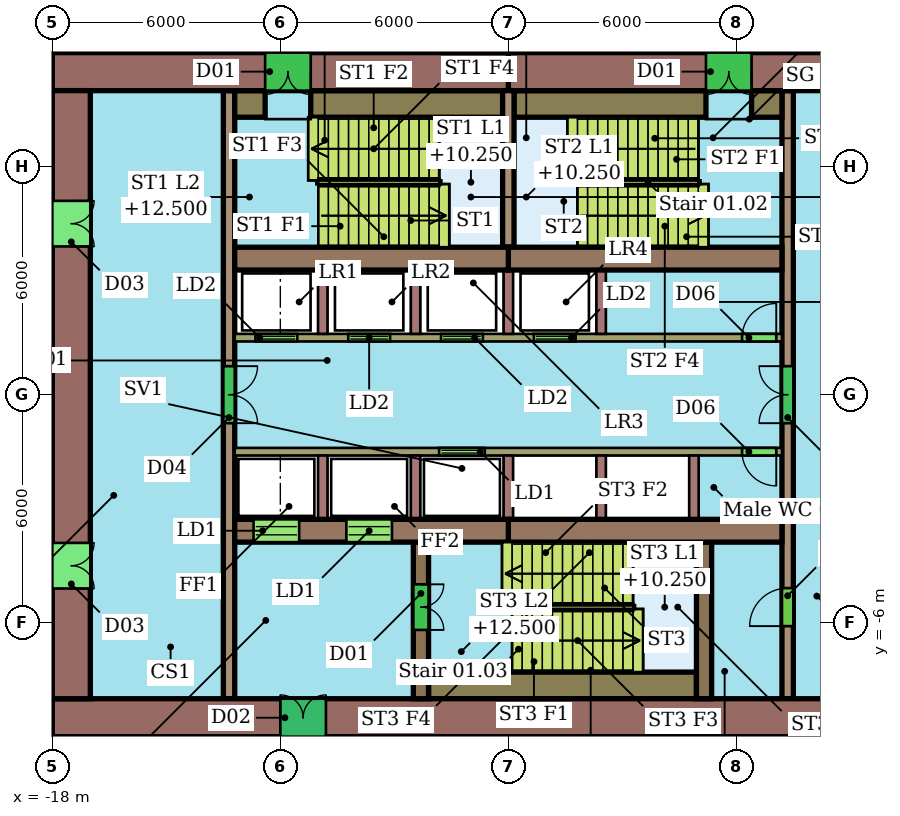
"""IFC4 building model, lengths in metres.
Left out: names, types, materials, properties, quantities, classifications, styles, units other than length and angle.
Written with IfcOpenShell. Run it as: python <this file> out.ifc"""

import sys

from ifc_helpers import new_model, si_unit, direction, frame, frame_2d, origin, place, context, subcontext, project, spatial, rectangle, extrude, element, fill, save


model = new_model("IFC4")
c1 = context("Model", 3, precision=1e-05, world=origin(), true_north=direction((0.0, 1.0)))
c2 = subcontext(c1, "Body", "Model", "MODEL_VIEW")
j1 = project(units=[si_unit("LENGTHUNIT", "METRE"), si_unit("PLANEANGLEUNIT", "RADIAN")], contexts=[c1])
p1 = place(None, origin())
s1 = spatial("IfcSite", under=j1, at=p1, CompositionType="ELEMENT")
p2 = place(p1, origin())
s2 = spatial("IfcBuilding", under=s1, at=p2, CompositionType="ELEMENT")
p3 = place(p2, frame((0.0, 0.0, 8.0)))
s3 = spatial("IfcBuildingStorey", under=s2, at=p3, CompositionType="ELEMENT", Elevation=8.0)
p4 = place(p3, frame((6.0, 8.5, 0.0), z_axis=(0.0, 0.0, 1.0), x_axis=(-1.0, 0.0, 0.0)))
e1 = element("IfcWall", 1, at=p4, inside=s3, PredefinedType="SHEAR", context=c2, shape_type="SweptSolid", body=[
    extrude(rectangle(XDim=12.0, YDim=1.0, at=frame_2d((6.0, 0.0))), origin(), (0.0, 0.0, 1.0), 8.7),
])
p5 = place(p4, frame((5.6, 0.0, 0.0)))
e2 = element("IfcOpeningElement", 2, at=p5, cuts=e1, PredefinedType="OPENING", context=c2, shape_type="SweptSolid", body=[
    extrude(rectangle(XDim=1.2, YDim=2.1, at=frame_2d((0.6, 1.05))), frame((0.0, 0.51, 0.0), z_axis=(0.0, -1.0, 0.0), x_axis=(1.0, 0.0, 0.0)), (0.0, 0.0, 1.0), 1.02),
])
p6 = place(p3, frame((-6.0, 8.5, 0.0), z_axis=(0.0, 0.0, 1.0), x_axis=(-1.0, 0.0, 0.0)))
e3 = element("IfcWall", 3, at=p6, inside=s3, PredefinedType="SHEAR", context=c2, shape_type="SweptSolid", body=[
    extrude(rectangle(XDim=12.0, YDim=1.0, at=frame_2d((6.0, 0.0))), origin(), (0.0, 0.0, 1.0), 8.7),
])
p7 = place(p6, frame((5.2, 0.0, 0.0)))
e4 = element("IfcOpeningElement", 4, at=p7, cuts=e3, PredefinedType="OPENING", context=c2, shape_type="SweptSolid", body=[
    extrude(rectangle(XDim=1.2, YDim=2.1, at=frame_2d((0.6, 1.05))), frame((0.0, 0.51, 0.0), z_axis=(0.0, -1.0, 0.0), x_axis=(1.0, 0.0, 0.0)), (0.0, 0.0, 1.0), 1.02),
])
p8 = place(p3, frame((-18.0, -8.5, 0.0), z_axis=(0.0, 0.0, 1.0), x_axis=(1.0, 0.0, 0.0)))
e5 = element("IfcWall", 5, at=p8, inside=s3, PredefinedType="SHEAR", context=c2, shape_type="SweptSolid", body=[
    extrude(rectangle(XDim=24.0, YDim=1.0, at=frame_2d((12.0, 0.0))), origin(), (0.0, 0.0, 1.0), 8.7),
])
p9 = place(p8, frame((6.0, 0.0, 0.0)))
e6 = element("IfcOpeningElement", 6, at=p9, cuts=e5, PredefinedType="OPENING", context=c2, shape_type="SweptSolid", body=[
    extrude(rectangle(XDim=1.2, YDim=2.1, at=frame_2d((0.6, 1.05))), frame((0.0, 0.51, 0.0), z_axis=(0.0, -1.0, 0.0), x_axis=(1.0, 0.0, 0.0)), (0.0, 0.0, 1.0), 1.02),
])
p10 = place(p3, frame((-17.5, 8.0, 0.0), z_axis=(0.0, 0.0, 1.0), x_axis=(0.0, -1.0, 0.0)))
e7 = element("IfcWall", 7, at=p10, inside=s3, PredefinedType="SHEAR", context=c2, shape_type="SweptSolid", body=[
    extrude(rectangle(XDim=16.0, YDim=1.0, at=frame_2d((8.0, 0.0))), origin(), (0.0, 0.0, 1.0), 8.7),
])
p11 = place(p10, frame((11.9, 0.0, 0.0)))
e8 = element("IfcOpeningElement", 8, at=p11, cuts=e7, PredefinedType="OPENING", context=c2, shape_type="SweptSolid", body=[
    extrude(rectangle(XDim=1.2, YDim=2.1, at=frame_2d((0.6, 1.05))), frame((0.0, 0.51, 0.0), z_axis=(0.0, -1.0, 0.0), x_axis=(1.0, 0.0, 0.0)), (0.0, 0.0, 1.0), 1.02),
])
p12 = place(p10, frame((2.9, 0.0, 0.0)))
e9 = element("IfcOpeningElement", 9, at=p12, cuts=e7, PredefinedType="OPENING", context=c2, shape_type="SweptSolid", body=[
    extrude(rectangle(XDim=1.2, YDim=2.1, at=frame_2d((0.6, 1.05))), frame((0.0, 0.51, 0.0), z_axis=(0.0, -1.0, 0.0), x_axis=(1.0, 0.0, 0.0)), (0.0, 0.0, 1.0), 1.02),
])
for number, where, z_axis, x_axis in (
    (10, (-13.2, 3.58, 0.0), (0.0, 0.0, 1.0), (1.0, 0.0, 0.0)),
    (11, (-6.0, 3.58, 0.0), (0.0, 0.0, 1.0), (1.0, 0.0, 0.0)),
):
    element("IfcWall", number, at=place(p3, frame(where, z_axis=z_axis, x_axis=x_axis)), inside=s3, PredefinedType="SHEAR", context=c2, shape_type="SweptSolid", body=[
        extrude(rectangle(XDim=7.2, YDim=0.6, at=frame_2d((3.6, 0.0))), origin(), (0.0, 0.0, 1.0), 8.7),
    ])
p13 = place(p3, frame((-13.2, -3.58, 0.0), z_axis=(0.0, 0.0, 1.0), x_axis=(1.0, 0.0, 0.0)))
e12 = element("IfcWall", 12, at=p13, inside=s3, PredefinedType="SHEAR", context=c2, shape_type="SweptSolid", body=[
    extrude(rectangle(XDim=7.2, YDim=0.6, at=frame_2d((3.6, 0.0))), origin(), (0.0, 0.0, 1.0), 8.7),
])
p14 = place(p13, frame((0.496, 0.0, 0.0)))
e13 = element("IfcOpeningElement", 13, at=p14, cuts=e12, PredefinedType="OPENING", context=c2, shape_type="SweptSolid", body=[
    extrude(rectangle(XDim=1.2, YDim=2.1, at=frame_2d((0.6, 1.05))), frame((0.0, 0.31, 0.0), z_axis=(0.0, -1.0, 0.0), x_axis=(1.0, 0.0, 0.0)), (0.0, 0.0, 1.0), 0.62),
])
p15 = place(p13, frame((2.938, 0.0, 0.0)))
e14 = element("IfcOpeningElement", 14, at=p15, cuts=e12, PredefinedType="OPENING", context=c2, shape_type="SweptSolid", body=[
    extrude(rectangle(XDim=1.2, YDim=2.1, at=frame_2d((0.6, 1.05))), frame((0.0, 0.31, 0.0), z_axis=(0.0, -1.0, 0.0), x_axis=(1.0, 0.0, 0.0)), (0.0, 0.0, 1.0), 0.62),
])
p16 = place(p3, frame((-6.0, -3.58, 0.0), z_axis=(0.0, 0.0, 1.0), x_axis=(1.0, 0.0, 0.0)))
e15 = element("IfcWall", 15, at=p16, inside=s3, PredefinedType="SHEAR", context=c2, shape_type="SweptSolid", body=[
    extrude(rectangle(XDim=7.2, YDim=0.6, at=frame_2d((3.6, 0.0))), origin(), (0.0, 0.0, 1.0), 8.7),
])
p17 = place(p3, frame((-13.35, 8.0, 0.0), z_axis=(0.0, 0.0, 1.0), x_axis=(0.0, -1.0, 0.0)))
e16 = element("IfcWall", 16, at=p17, inside=s3, PredefinedType="SHEAR", context=c2, shape_type="SweptSolid", body=[
    extrude(rectangle(XDim=16.0, YDim=0.3, at=frame_2d((8.0, 0.0))), origin(), (0.0, 0.0, 1.0), 8.7),
])
p18 = place(p17, frame((7.25, 0.0, 0.0)))
e17 = element("IfcOpeningElement", 17, at=p18, cuts=e16, PredefinedType="OPENING", context=c2, shape_type="SweptSolid", body=[
    extrude(rectangle(XDim=1.5, YDim=2.1, at=frame_2d((0.75, 1.05))), frame((0.0, 0.16, 0.0), z_axis=(0.0, -1.0, 0.0), x_axis=(1.0, 0.0, 0.0)), (0.0, 0.0, 1.0), 0.32),
])
p19 = place(p3, frame((1.35, -8.0, 0.0), z_axis=(0.0, 0.0, 1.0), x_axis=(0.0, 1.0, 0.0)))
e18 = element("IfcWall", 18, at=p19, inside=s3, PredefinedType="SHEAR", context=c2, shape_type="SweptSolid", body=[
    extrude(rectangle(XDim=16.0, YDim=0.3, at=frame_2d((8.0, 0.0))), origin(), (0.0, 0.0, 1.0), 8.7),
])
p20 = place(p19, frame((1.91, 0.0, 0.0)))
e19 = element("IfcOpeningElement", 19, at=p20, cuts=e18, PredefinedType="OPENING", context=c2, shape_type="SweptSolid", body=[
    extrude(rectangle(XDim=1.0, YDim=2.1, at=frame_2d((0.5, 1.05))), frame((0.0, 0.16, 0.0), z_axis=(0.0, -1.0, 0.0), x_axis=(1.0, 0.0, 0.0)), (0.0, 0.0, 1.0), 0.32),
])
p21 = place(p19, frame((7.25, 0.0, 0.0)))
e20 = element("IfcOpeningElement", 20, at=p21, cuts=e18, PredefinedType="OPENING", context=c2, shape_type="SweptSolid", body=[
    extrude(rectangle(XDim=1.5, YDim=2.1, at=frame_2d((0.75, 1.05))), frame((0.0, 0.16, 0.0), z_axis=(0.0, -1.0, 0.0), x_axis=(1.0, 0.0, 0.0)), (0.0, 0.0, 1.0), 0.32),
])
p22 = place(p3, frame((-13.2, 1.5, 0.0), z_axis=(0.0, 0.0, 1.0), x_axis=(1.0, 0.0, 0.0)))
e21 = element("IfcWall", 21, at=p22, inside=s3, PredefinedType="SHEAR", context=c2, shape_type="SweptSolid", body=[
    extrude(rectangle(XDim=14.4, YDim=0.2, at=frame_2d((7.2, 0.0))), origin(), (0.0, 0.0, 1.0), 8.7),
])
p23 = place(p22, frame((0.546, 0.0, 0.0)))
e22 = element("IfcOpeningElement", 22, at=p23, cuts=e21, PredefinedType="OPENING", context=c2, shape_type="SweptSolid", body=[
    extrude(rectangle(XDim=1.1, YDim=2.1, at=frame_2d((0.55, 1.05))), frame((0.0, 0.11, 0.0), z_axis=(0.0, -1.0, 0.0), x_axis=(1.0, 0.0, 0.0)), (0.0, 0.0, 1.0), 0.22),
])
p24 = place(p22, frame((2.988, 0.0, 0.0)))
e23 = element("IfcOpeningElement", 23, at=p24, cuts=e21, PredefinedType="OPENING", context=c2, shape_type="SweptSolid", body=[
    extrude(rectangle(XDim=1.1, YDim=2.1, at=frame_2d((0.55, 1.05))), frame((0.0, 0.11, 0.0), z_axis=(0.0, -1.0, 0.0), x_axis=(1.0, 0.0, 0.0)), (0.0, 0.0, 1.0), 0.22),
])
p25 = place(p22, frame((5.429, 0.0, 0.0)))
e24 = element("IfcOpeningElement", 24, at=p25, cuts=e21, PredefinedType="OPENING", context=c2, shape_type="SweptSolid", body=[
    extrude(rectangle(XDim=1.1, YDim=2.1, at=frame_2d((0.55, 1.05))), frame((0.0, 0.11, 0.0), z_axis=(0.0, -1.0, 0.0), x_axis=(1.0, 0.0, 0.0)), (0.0, 0.0, 1.0), 0.22),
])
p26 = place(p22, frame((7.871, 0.0, 0.0)))
e25 = element("IfcOpeningElement", 25, at=p26, cuts=e21, PredefinedType="OPENING", context=c2, shape_type="SweptSolid", body=[
    extrude(rectangle(XDim=1.1, YDim=2.1, at=frame_2d((0.55, 1.05))), frame((0.0, 0.11, 0.0), z_axis=(0.0, -1.0, 0.0), x_axis=(1.0, 0.0, 0.0)), (0.0, 0.0, 1.0), 0.22),
])
p27 = place(p22, frame((13.35, 0.0, 0.0)))
e26 = element("IfcOpeningElement", 26, at=p27, cuts=e21, PredefinedType="OPENING", context=c2, shape_type="SweptSolid", body=[
    extrude(rectangle(XDim=0.9, YDim=2.1, at=frame_2d((0.45, 1.05))), frame((0.0, 0.11, 0.0), z_axis=(0.0, -1.0, 0.0), x_axis=(1.0, 0.0, 0.0)), (0.0, 0.0, 1.0), 0.22),
])
p28 = place(p3, frame((1.2, -1.5, 0.0), z_axis=(0.0, 0.0, 1.0), x_axis=(-1.0, 0.0, 0.0)))
e27 = element("IfcWall", 27, at=p28, inside=s3, PredefinedType="SHEAR", context=c2, shape_type="SweptSolid", body=[
    extrude(rectangle(XDim=14.4, YDim=0.2, at=frame_2d((7.2, 0.0))), origin(), (0.0, 0.0, 1.0), 8.7),
])
p29 = place(p28, frame((7.821, 0.0, 0.0)))
e28 = element("IfcOpeningElement", 28, at=p29, cuts=e27, PredefinedType="OPENING", context=c2, shape_type="SweptSolid", body=[
    extrude(rectangle(XDim=1.2, YDim=2.1, at=frame_2d((0.6, 1.05))), frame((0.0, 0.11, 0.0), z_axis=(0.0, -1.0, 0.0), x_axis=(1.0, 0.0, 0.0)), (0.0, 0.0, 1.0), 0.22),
])
p30 = place(p28, frame((0.15, 0.0, 0.0)))
e29 = element("IfcOpeningElement", 29, at=p30, cuts=e27, PredefinedType="OPENING", context=c2, shape_type="SweptSolid", body=[
    extrude(rectangle(XDim=0.9, YDim=2.1, at=frame_2d((0.45, 1.05))), frame((0.0, 0.11, 0.0), z_axis=(0.0, -1.0, 0.0), x_axis=(1.0, 0.0, 0.0)), (0.0, 0.0, 1.0), 0.22),
])
p31 = place(p3, frame((-8.3, -3.88, 0.0), z_axis=(0.0, 0.0, 1.0), x_axis=(0.0, -1.0, 0.0)))
e30 = element("IfcWall", 30, at=p31, inside=s3, PredefinedType="SHEAR", context=c2, shape_type="SweptSolid", body=[
    extrude(rectangle(XDim=4.12, YDim=0.4, at=frame_2d((2.06, 0.0))), origin(), (0.0, 0.0, 1.0), 8.7),
])
p32 = place(p31, frame((1.11, 0.0, 0.0)))
e31 = element("IfcOpeningElement", 31, at=p32, cuts=e30, PredefinedType="OPENING", context=c2, shape_type="SweptSolid", body=[
    extrude(rectangle(XDim=1.2, YDim=2.1, at=frame_2d((0.6, 1.05))), frame((0.0, 0.21, 0.0), z_axis=(0.0, -1.0, 0.0), x_axis=(1.0, 0.0, 0.0)), (0.0, 0.0, 1.0), 0.42),
])
p33 = place(p3, frame((-0.85, -3.88, 0.0), z_axis=(0.0, 0.0, 1.0), x_axis=(0.0, -1.0, 0.0)))
e32 = element("IfcWall", 32, at=p33, inside=s3, PredefinedType="SHEAR", context=c2, shape_type="SweptSolid", body=[
    extrude(rectangle(XDim=4.12, YDim=0.4, at=frame_2d((2.06, 0.0))), origin(), (0.0, 0.0, 1.0), 8.7),
])
p34 = place(p3, frame((-6.0, 3.88, 0.0), z_axis=(0.0, 0.0, 1.0), x_axis=(0.0, 1.0, 0.0)))
e33 = element("IfcWall", 33, at=p34, inside=s3, PredefinedType="SHEAR", context=c2, shape_type="SweptSolid", body=[
    extrude(rectangle(XDim=4.12, YDim=0.3, at=frame_2d((2.06, 0.0))), origin(), (0.0, 0.0, 1.0), 8.7),
])
p35 = place(p3, frame((-13.2, 7.65, 0.0), z_axis=(0.0, 0.0, 1.0), x_axis=(1.0, 0.0, 0.0)))
e34 = element("IfcWall", 34, at=p35, inside=s3, PredefinedType="SHEAR", context=c2, shape_type="SweptSolid", body=[
    extrude(rectangle(XDim=0.8, YDim=0.7, at=frame_2d((0.4, 0.0))), origin(), (0.0, 0.0, 1.0), 8.7),
])
for number, where, z_axis, x_axis in (
    (35, (-11.2, 7.65, 0.0), (0.0, 0.0, 1.0), (1.0, 0.0, 0.0)),
    (36, (-5.85, 7.65, 0.0), (0.0, 0.0, 1.0), (1.0, 0.0, 0.0)),
):
    element("IfcWall", number, at=place(p3, frame(where, z_axis=z_axis, x_axis=x_axis)), inside=s3, PredefinedType="SHEAR", context=c2, shape_type="SweptSolid", body=[
        extrude(rectangle(XDim=5.05, YDim=0.7, at=frame_2d((2.525, 0.0))), origin(), (0.0, 0.0, 1.0), 8.7),
    ])
p36 = place(p3, frame((0.4, 7.65, 0.0), z_axis=(0.0, 0.0, 1.0), x_axis=(1.0, 0.0, 0.0)))
e37 = element("IfcWall", 37, at=p36, inside=s3, PredefinedType="SHEAR", context=c2, shape_type="SweptSolid", body=[
    extrude(rectangle(XDim=0.8, YDim=0.7, at=frame_2d((0.4, 0.0))), origin(), (0.0, 0.0, 1.0), 8.7),
])
p37 = place(p3, frame((-8.1, -7.65, 0.0), z_axis=(0.0, 0.0, 1.0), x_axis=(1.0, 0.0, 0.0)))
e38 = element("IfcWall", 38, at=p37, inside=s3, PredefinedType="SHEAR", context=c2, shape_type="SweptSolid", body=[
    extrude(rectangle(XDim=7.05, YDim=0.7, at=frame_2d((3.525, 0.0))), origin(), (0.0, 0.0, 1.0), 8.7),
])
for number, where, z_axis, x_axis in (
    (39, (-10.883, 1.6, 0.0), (0.0, 0.0, 1.0), (0.0, 1.0, 0.0)),
    (40, (-8.442, 1.6, 0.0), (0.0, 0.0, 1.0), (0.0, 1.0, 0.0)),
    (41, (-6.0, 1.6, 0.0), (0.0, 0.0, 1.0), (0.0, 1.0, 0.0)),
    (42, (-3.558, 1.6, 0.0), (0.0, 0.0, 1.0), (0.0, 1.0, 0.0)),
    (43, (-10.883, -1.6, 0.0), (0.0, 0.0, 1.0), (0.0, -1.0, 0.0)),
    (44, (-8.442, -1.6, 0.0), (0.0, 0.0, 1.0), (0.0, -1.0, 0.0)),
    (45, (-6.0, -1.6, 0.0), (0.0, 0.0, 1.0), (0.0, -1.0, 0.0)),
    (46, (-3.558, -1.6, 0.0), (0.0, 0.0, 1.0), (0.0, -1.0, 0.0)),
    (47, (-1.117, -1.6, 0.0), (0.0, 0.0, 1.0), (0.0, -1.0, 0.0)),
):
    element("IfcWall", number, at=place(p3, frame(where, z_axis=z_axis, x_axis=x_axis)), inside=s3, PredefinedType="SHEAR", context=c2, shape_type="SweptSolid", body=[
        extrude(rectangle(XDim=1.68, YDim=0.25, at=frame_2d((0.84, 0.0))), origin(), (0.0, 0.0, 1.0), 8.7),
    ])
p38 = place(p5, origin())
e48 = element("IfcDoor", 48, at=p38, inside=s3, OperationType="DOUBLE_DOOR_SINGLE_SWING", PredefinedType="NOTDEFINED", context=c2, shape_type="SweptSolid", body=[
    extrude(rectangle(XDim=1.2, YDim=2.1, at=frame_2d((0.6, 1.05))), frame((0.0, 0.025, 0.0), z_axis=(0.0, -1.0, 0.0), x_axis=(1.0, 0.0, 0.0)), (0.0, 0.0, 1.0), 0.05),
])
fill(e2, e48)
p39 = place(p7, origin())
e49 = element("IfcDoor", 49, at=p39, inside=s3, OperationType="DOUBLE_DOOR_SINGLE_SWING", PredefinedType="NOTDEFINED", context=c2, shape_type="SweptSolid", body=[
    extrude(rectangle(XDim=1.2, YDim=2.1, at=frame_2d((0.6, 1.05))), frame((0.0, 0.025, 0.0), z_axis=(0.0, -1.0, 0.0), x_axis=(1.0, 0.0, 0.0)), (0.0, 0.0, 1.0), 0.05),
])
fill(e4, e49)
p40 = place(p9, origin())
e50 = element("IfcDoor", 50, at=p40, inside=s3, OperationType="DOUBLE_DOOR_SINGLE_SWING", PredefinedType="NOTDEFINED", context=c2, shape_type="SweptSolid", body=[
    extrude(rectangle(XDim=1.2, YDim=2.1, at=frame_2d((0.6, 1.05))), frame((0.0, 0.025, 0.0), z_axis=(0.0, -1.0, 0.0), x_axis=(1.0, 0.0, 0.0)), (0.0, 0.0, 1.0), 0.05),
])
fill(e6, e50)
p41 = place(p11, origin())
e51 = element("IfcDoor", 51, at=p41, inside=s3, OperationType="DOUBLE_DOOR_SINGLE_SWING", PredefinedType="NOTDEFINED", context=c2, shape_type="SweptSolid", body=[
    extrude(rectangle(XDim=1.2, YDim=2.1, at=frame_2d((0.6, 1.05))), frame((0.0, 0.025, 0.0), z_axis=(0.0, -1.0, 0.0), x_axis=(1.0, 0.0, 0.0)), (0.0, 0.0, 1.0), 0.05),
])
fill(e8, e51)
p42 = place(p12, origin())
e52 = element("IfcDoor", 52, at=p42, inside=s3, OperationType="DOUBLE_DOOR_SINGLE_SWING", PredefinedType="NOTDEFINED", context=c2, shape_type="SweptSolid", body=[
    extrude(rectangle(XDim=1.2, YDim=2.1, at=frame_2d((0.6, 1.05))), frame((0.0, 0.025, 0.0), z_axis=(0.0, -1.0, 0.0), x_axis=(1.0, 0.0, 0.0)), (0.0, 0.0, 1.0), 0.05),
])
fill(e9, e52)
p43 = place(p14, origin())
e53 = element("IfcDoor", 53, at=p43, inside=s3, OperationType="DOUBLE_DOOR_SLIDING", PredefinedType="NOTDEFINED", context=c2, shape_type="SweptSolid", body=[
    extrude(rectangle(XDim=1.2, YDim=2.1, at=frame_2d((0.6, 1.05))), frame((0.0, 0.025, 0.0), z_axis=(0.0, -1.0, 0.0), x_axis=(1.0, 0.0, 0.0)), (0.0, 0.0, 1.0), 0.05),
])
fill(e13, e53)
p44 = place(p15, origin())
e54 = element("IfcDoor", 54, at=p44, inside=s3, OperationType="DOUBLE_DOOR_SLIDING", PredefinedType="NOTDEFINED", context=c2, shape_type="SweptSolid", body=[
    extrude(rectangle(XDim=1.2, YDim=2.1, at=frame_2d((0.6, 1.05))), frame((0.0, 0.025, 0.0), z_axis=(0.0, -1.0, 0.0), x_axis=(1.0, 0.0, 0.0)), (0.0, 0.0, 1.0), 0.05),
])
fill(e14, e54)
p45 = place(p18, origin())
e55 = element("IfcDoor", 55, at=p45, inside=s3, OperationType="DOUBLE_DOOR_SINGLE_SWING", PredefinedType="NOTDEFINED", context=c2, shape_type="SweptSolid", body=[
    extrude(rectangle(XDim=1.5, YDim=2.1, at=frame_2d((0.75, 1.05))), frame((0.0, 0.025, 0.0), z_axis=(0.0, -1.0, 0.0), x_axis=(1.0, 0.0, 0.0)), (0.0, 0.0, 1.0), 0.05),
])
fill(e17, e55)
p46 = place(p20, origin())
e56 = element("IfcDoor", 56, at=p46, inside=s3, OperationType="SINGLE_SWING_LEFT", PredefinedType="NOTDEFINED", context=c2, shape_type="SweptSolid", body=[
    extrude(rectangle(XDim=1.0, YDim=2.1, at=frame_2d((0.5, 1.05))), frame((0.0, 0.025, 0.0), z_axis=(0.0, -1.0, 0.0), x_axis=(1.0, 0.0, 0.0)), (0.0, 0.0, 1.0), 0.05),
])
fill(e19, e56)
p47 = place(p21, origin())
e57 = element("IfcDoor", 57, at=p47, inside=s3, OperationType="DOUBLE_DOOR_SINGLE_SWING", PredefinedType="NOTDEFINED", context=c2, shape_type="SweptSolid", body=[
    extrude(rectangle(XDim=1.5, YDim=2.1, at=frame_2d((0.75, 1.05))), frame((0.0, 0.025, 0.0), z_axis=(0.0, -1.0, 0.0), x_axis=(1.0, 0.0, 0.0)), (0.0, 0.0, 1.0), 0.05),
])
fill(e20, e57)
p48 = place(p23, origin())
e58 = element("IfcDoor", 58, at=p48, inside=s3, OperationType="DOUBLE_DOOR_SLIDING", PredefinedType="NOTDEFINED", context=c2, shape_type="SweptSolid", body=[
    extrude(rectangle(XDim=1.1, YDim=2.1, at=frame_2d((0.55, 1.05))), frame((0.0, 0.025, 0.0), z_axis=(0.0, -1.0, 0.0), x_axis=(1.0, 0.0, 0.0)), (0.0, 0.0, 1.0), 0.05),
])
fill(e22, e58)
p49 = place(p24, origin())
e59 = element("IfcDoor", 59, at=p49, inside=s3, OperationType="DOUBLE_DOOR_SLIDING", PredefinedType="NOTDEFINED", context=c2, shape_type="SweptSolid", body=[
    extrude(rectangle(XDim=1.1, YDim=2.1, at=frame_2d((0.55, 1.05))), frame((0.0, 0.025, 0.0), z_axis=(0.0, -1.0, 0.0), x_axis=(1.0, 0.0, 0.0)), (0.0, 0.0, 1.0), 0.05),
])
fill(e23, e59)
p50 = place(p25, origin())
e60 = element("IfcDoor", 60, at=p50, inside=s3, OperationType="DOUBLE_DOOR_SLIDING", PredefinedType="NOTDEFINED", context=c2, shape_type="SweptSolid", body=[
    extrude(rectangle(XDim=1.1, YDim=2.1, at=frame_2d((0.55, 1.05))), frame((0.0, 0.025, 0.0), z_axis=(0.0, -1.0, 0.0), x_axis=(1.0, 0.0, 0.0)), (0.0, 0.0, 1.0), 0.05),
])
fill(e24, e60)
p51 = place(p26, origin())
e61 = element("IfcDoor", 61, at=p51, inside=s3, OperationType="DOUBLE_DOOR_SLIDING", PredefinedType="NOTDEFINED", context=c2, shape_type="SweptSolid", body=[
    extrude(rectangle(XDim=1.1, YDim=2.1, at=frame_2d((0.55, 1.05))), frame((0.0, 0.025, 0.0), z_axis=(0.0, -1.0, 0.0), x_axis=(1.0, 0.0, 0.0)), (0.0, 0.0, 1.0), 0.05),
])
fill(e25, e61)
p52 = place(p27, origin())
e62 = element("IfcDoor", 62, at=p52, inside=s3, OperationType="SINGLE_SWING_RIGHT", PredefinedType="NOTDEFINED", context=c2, shape_type="SweptSolid", body=[
    extrude(rectangle(XDim=0.9, YDim=2.1, at=frame_2d((0.45, 1.05))), frame((0.0, 0.025, 0.0), z_axis=(0.0, -1.0, 0.0), x_axis=(1.0, 0.0, 0.0)), (0.0, 0.0, 1.0), 0.05),
])
fill(e26, e62)
p53 = place(p29, origin())
e63 = element("IfcDoor", 63, at=p53, inside=s3, OperationType="DOUBLE_DOOR_SLIDING", PredefinedType="NOTDEFINED", context=c2, shape_type="SweptSolid", body=[
    extrude(rectangle(XDim=1.2, YDim=2.1, at=frame_2d((0.6, 1.05))), frame((0.0, 0.025, 0.0), z_axis=(0.0, -1.0, 0.0), x_axis=(1.0, 0.0, 0.0)), (0.0, 0.0, 1.0), 0.05),
])
fill(e28, e63)
p54 = place(p30, origin())
e64 = element("IfcDoor", 64, at=p54, inside=s3, OperationType="SINGLE_SWING_LEFT", PredefinedType="NOTDEFINED", context=c2, shape_type="SweptSolid", body=[
    extrude(rectangle(XDim=0.9, YDim=2.1, at=frame_2d((0.45, 1.05))), frame((0.0, 0.025, 0.0), z_axis=(0.0, -1.0, 0.0), x_axis=(1.0, 0.0, 0.0)), (0.0, 0.0, 1.0), 0.05),
])
fill(e29, e64)
p55 = place(p32, origin())
e65 = element("IfcDoor", 65, at=p55, inside=s3, OperationType="DOUBLE_DOOR_SINGLE_SWING", PredefinedType="NOTDEFINED", context=c2, shape_type="SweptSolid", body=[
    extrude(rectangle(XDim=1.2, YDim=2.1, at=frame_2d((0.6, 1.05))), frame((0.0, 0.025, 0.0), z_axis=(0.0, -1.0, 0.0), x_axis=(1.0, 0.0, 0.0)), (0.0, 0.0, 1.0), 0.05),
])
fill(e31, e65)
save(model, sys.argv[1])
